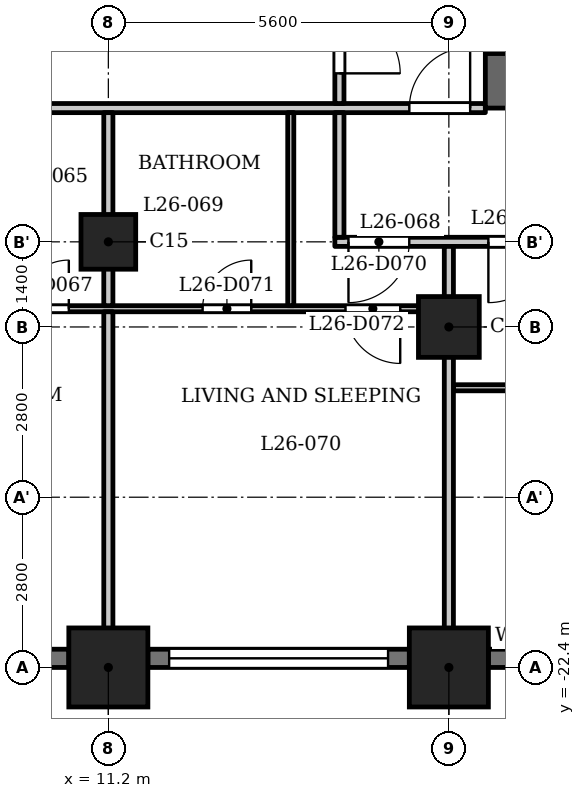
"""IFC4 building model, lengths in metres.
Left out: names, types, materials, properties, quantities, classifications, styles, units other than length and angle.
Written with IfcOpenShell. Run it as: python <this file> out.ifc"""

import sys

from ifc_helpers import new_model, si_unit, direction, frame, frame_2d, origin, origin_2d, place, context, subcontext, project, spatial, rectangle, extrude, element, fill, save


model = new_model("IFC4")
c1 = context("Model", 3, precision=1e-05, world=origin(), true_north=direction((0.0, 1.0)))
c2 = subcontext(c1, "Body", "Model", "MODEL_VIEW")
j1 = project(units=[si_unit("LENGTHUNIT", "METRE"), si_unit("PLANEANGLEUNIT", "RADIAN")], contexts=[c1])
p1 = place(None, origin())
s1 = spatial("IfcSite", under=j1, at=p1, CompositionType="ELEMENT")
p2 = place(p1, origin())
s2 = spatial("IfcBuilding", under=s1, at=p2, CompositionType="ELEMENT")
p3 = place(p2, frame((0.0, 0.0, 104.3)))
s3 = spatial("IfcBuildingStorey", under=s2, at=p3, CompositionType="ELEMENT", Elevation=104.3)
for number, where, z_axis, x_axis in (
    (1, (11.2, -22.4, 0.0), (0.0, 0.0, 1.0), (1.0, 0.0, 0.0)),
    (2, (16.8, -22.4, 0.0), (0.0, 0.0, 1.0), (1.0, 0.0, 0.0)),
):
    element("IfcColumn", number, at=place(p3, frame(where, z_axis=z_axis, x_axis=x_axis)), inside=s3, PredefinedType="COLUMN", context=c2, shape_type="SweptSolid", body=[
        extrude(rectangle(XDim=1.3, YDim=1.3, at=origin_2d()), origin(), (0.0, 0.0, 1.0), 3.5),
    ])
p4 = place(p3, frame((16.8, -16.8, 0.0), z_axis=(0.0, 0.0, 1.0), x_axis=(1.0, 0.0, 0.0)))
e3 = element("IfcColumn", 3, at=p4, inside=s3, PredefinedType="COLUMN", context=c2, shape_type="SweptSolid", body=[
    extrude(rectangle(XDim=1.0, YDim=1.0, at=origin_2d()), origin(), (0.0, 0.0, 1.0), 3.5),
])
p5 = place(p3, frame((11.2, -15.4, 0.0), z_axis=(0.0, 0.0, 1.0), x_axis=(1.0, 0.0, 0.0)))
e4 = element("IfcColumn", 4, at=p5, inside=s3, PredefinedType="COLUMN", context=c2, shape_type="SweptSolid", body=[
    extrude(rectangle(XDim=0.9, YDim=0.9, at=origin_2d()), origin(), (0.0, 0.0, 1.0), 3.5),
])
p6 = place(p3, frame((6.25, -22.25, 0.0), z_axis=(0.0, 0.0, 1.0), x_axis=(1.0, 0.0, 0.0)))
e5 = element("IfcWall", 5, at=p6, inside=s3, PredefinedType="SOLIDWALL", context=c2, shape_type="SweptSolid", body=[
    extrude(rectangle(XDim=4.3, YDim=0.3, at=frame_2d((2.15, 0.0))), origin(), (0.0, 0.0, 1.0), 2.4),
])
p7 = place(p6, frame((0.337, 0.0, 0.6)))
e6 = element("IfcOpeningElement", 6, at=p7, cuts=e5, PredefinedType="OPENING", context=c2, shape_type="SweptSolid", body=[
    extrude(rectangle(XDim=1.2, YDim=1.55, at=frame_2d((0.6, 0.775))), frame((0.0, 0.16, 0.0), z_axis=(0.0, -1.0, 0.0), x_axis=(1.0, 0.0, 0.0)), (0.0, 0.0, 1.0), 0.32),
])
p8 = place(p6, frame((2.562, 0.0, 0.6)))
e7 = element("IfcOpeningElement", 7, at=p8, cuts=e5, PredefinedType="OPENING", context=c2, shape_type="SweptSolid", body=[
    extrude(rectangle(XDim=1.2, YDim=1.55, at=frame_2d((0.6, 0.775))), frame((0.0, 0.16, 0.0), z_axis=(0.0, -1.0, 0.0), x_axis=(1.0, 0.0, 0.0)), (0.0, 0.0, 1.0), 0.32),
])
p9 = place(p3, frame((11.85, -22.25, 0.0), z_axis=(0.0, 0.0, 1.0), x_axis=(1.0, 0.0, 0.0)))
e8 = element("IfcWall", 8, at=p9, inside=s3, PredefinedType="SOLIDWALL", context=c2, shape_type="SweptSolid", body=[
    extrude(rectangle(XDim=4.3, YDim=0.3, at=frame_2d((2.15, 0.0))), origin(), (0.0, 0.0, 1.0), 2.4),
])
p10 = place(p9, frame((0.35, 0.0, 1.2)))
e9 = element("IfcOpeningElement", 9, at=p10, cuts=e8, PredefinedType="OPENING", context=c2, shape_type="SweptSolid", body=[
    extrude(rectangle(XDim=3.6, YDim=0.95, at=frame_2d((1.8, 0.475))), frame((0.0, 0.16, 0.0), z_axis=(0.0, -1.0, 0.0), x_axis=(1.0, 0.0, 0.0)), (0.0, 0.0, 1.0), 0.32),
])
p11 = place(p3, frame((17.45, -22.25, 0.0), z_axis=(0.0, 0.0, 1.0), x_axis=(1.0, 0.0, 0.0)))
e10 = element("IfcWall", 10, at=p11, inside=s3, PredefinedType="SOLIDWALL", context=c2, shape_type="SweptSolid", body=[
    extrude(rectangle(XDim=2.55, YDim=0.3, at=frame_2d((1.275, 0.0))), origin(), (0.0, 0.0, 1.0), 2.4),
])
p12 = place(p11, frame((0.375, 0.0, 0.9)))
e11 = element("IfcOpeningElement", 11, at=p12, cuts=e10, PredefinedType="OPENING", context=c2, shape_type="SweptSolid", body=[
    extrude(rectangle(XDim=1.8, YDim=1.25, at=frame_2d((0.9, 0.625))), frame((0.0, 0.16, 0.0), z_axis=(0.0, -1.0, 0.0), x_axis=(1.0, 0.0, 0.0)), (0.0, 0.0, 1.0), 0.32),
])
p13 = place(p3, frame((17.4, -12.75, 0.0), z_axis=(0.0, 0.0, 1.0), x_axis=(1.0, 0.0, 0.0)))
e12 = element("IfcWall", 12, at=p13, inside=s3, PredefinedType="SHEAR", context=c2, shape_type="SweptSolid", body=[
    extrude(rectangle(XDim=10.4, YDim=0.9, at=frame_2d((5.2, 0.0))), origin(), (0.0, 0.0, 1.0), 3.2),
])
p14 = place(p3, frame((17.6, -12.3, 0.0), z_axis=(0.0, 0.0, 1.0), x_axis=(0.0, 1.0, 0.0)))
e13 = element("IfcWall", 13, at=p14, inside=s3, PredefinedType="SHEAR", context=c2, shape_type="SweptSolid", body=[
    extrude(rectangle(XDim=24.6, YDim=0.4, at=frame_2d((12.3, 0.0))), origin(), (0.0, 0.0, 1.0), 3.2),
])
p15 = place(p14, frame((6.0, 0.0, 0.0)))
e14 = element("IfcOpeningElement", 14, at=p15, cuts=e13, PredefinedType="OPENING", context=c2, shape_type="SweptSolid", body=[
    extrude(rectangle(XDim=1.1, YDim=2.1, at=frame_2d((0.55, 1.05))), frame((0.0, 0.21, 0.0), z_axis=(0.0, -1.0, 0.0), x_axis=(1.0, 0.0, 0.0)), (0.0, 0.0, 1.0), 0.42),
])
p16 = place(p14, frame((8.4, 0.0, 0.0)))
e15 = element("IfcOpeningElement", 15, at=p16, cuts=e13, PredefinedType="OPENING", context=c2, shape_type="SweptSolid", body=[
    extrude(rectangle(XDim=1.1, YDim=2.1, at=frame_2d((0.55, 1.05))), frame((0.0, 0.21, 0.0), z_axis=(0.0, -1.0, 0.0), x_axis=(1.0, 0.0, 0.0)), (0.0, 0.0, 1.0), 0.42),
])
p17 = place(p14, frame((10.8, 0.0, 0.0)))
e16 = element("IfcOpeningElement", 16, at=p17, cuts=e13, PredefinedType="OPENING", context=c2, shape_type="SweptSolid", body=[
    extrude(rectangle(XDim=1.1, YDim=2.1, at=frame_2d((0.55, 1.05))), frame((0.0, 0.21, 0.0), z_axis=(0.0, -1.0, 0.0), x_axis=(1.0, 0.0, 0.0)), (0.0, 0.0, 1.0), 0.42),
])
p18 = place(p14, frame((16.75, 0.0, 0.0)))
e17 = element("IfcOpeningElement", 17, at=p18, cuts=e13, PredefinedType="OPENING", context=c2, shape_type="SweptSolid", body=[
    extrude(rectangle(XDim=0.9, YDim=2.1, at=frame_2d((0.45, 1.05))), frame((0.0, 0.21, 0.0), z_axis=(0.0, -1.0, 0.0), x_axis=(1.0, 0.0, 0.0)), (0.0, 0.0, 1.0), 0.42),
])
p19 = place(p14, frame((22.8, 0.0, 0.0)))
e18 = element("IfcOpeningElement", 18, at=p19, cuts=e13, PredefinedType="OPENING", context=c2, shape_type="SweptSolid", body=[
    extrude(rectangle(XDim=1.1, YDim=2.1, at=frame_2d((0.55, 1.05))), frame((0.0, 0.21, 0.0), z_axis=(0.0, -1.0, 0.0), x_axis=(1.0, 0.0, 0.0)), (0.0, 0.0, 1.0), 0.42),
])
p20 = place(p14, frame((0.7, 0.0, 0.0)))
e19 = element("IfcOpeningElement", 19, at=p20, cuts=e13, PredefinedType="OPENING", context=c2, shape_type="SweptSolid", body=[
    extrude(rectangle(XDim=1.1, YDim=2.1, at=frame_2d((0.55, 1.05))), frame((0.0, 0.21, 0.0), z_axis=(0.0, -1.0, 0.0), x_axis=(1.0, 0.0, 0.0)), (0.0, 0.0, 1.0), 0.42),
])
p21 = place(p14, frame((12.775, 0.0, 0.0)))
e20 = element("IfcOpeningElement", 20, at=p21, cuts=e13, PredefinedType="OPENING", context=c2, shape_type="SweptSolid", body=[
    extrude(rectangle(XDim=1.8, YDim=2.1, at=frame_2d((0.9, 1.05))), frame((0.0, 0.21, 0.0), z_axis=(0.0, -1.0, 0.0), x_axis=(1.0, 0.0, 0.0)), (0.0, 0.0, 1.0), 0.42),
])
p22 = place(p3, frame((16.875, -17.8, 0.0), z_axis=(0.0, 0.0, 1.0), x_axis=(1.0, 0.0, 0.0)))
e21 = element("IfcWall", 21, at=p22, inside=s3, PredefinedType="PARTITIONING", context=c2, shape_type="SweptSolid", body=[
    extrude(rectangle(XDim=9.679, YDim=0.1, at=frame_2d((4.84, 0.0))), origin(), (0.0, 0.0, 1.0), 3.2),
])
p23 = place(p22, frame((6.093, 0.0, 0.0)))
e22 = element("IfcOpeningElement", 22, at=p23, cuts=e21, PredefinedType="OPENING", context=c2, shape_type="SweptSolid", body=[
    extrude(rectangle(XDim=0.8, YDim=2.1, at=frame_2d((0.4, 1.05))), frame((0.0, 0.06, 0.0), z_axis=(0.0, -1.0, 0.0), x_axis=(1.0, 0.0, 0.0)), (0.0, 0.0, 1.0), 0.12),
])
p24 = place(p22, frame((1.575, 0.0, 0.0)))
e23 = element("IfcOpeningElement", 23, at=p24, cuts=e21, PredefinedType="OPENING", context=c2, shape_type="SweptSolid", body=[
    extrude(rectangle(XDim=0.9, YDim=2.1, at=frame_2d((0.45, 1.05))), frame((0.0, 0.06, 0.0), z_axis=(0.0, -1.0, 0.0), x_axis=(1.0, 0.0, 0.0)), (0.0, 0.0, 1.0), 0.12),
])
p25 = place(p3, frame((-16.725, -16.5, 0.0), z_axis=(0.0, 0.0, 1.0), x_axis=(1.0, 0.0, 0.0)))
e24 = element("IfcWall", 24, at=p25, inside=s3, PredefinedType="PARTITIONING", context=c2, shape_type="SweptSolid", body=[
    extrude(rectangle(XDim=33.45, YDim=0.1, at=frame_2d((16.725, 0.0))), origin(), (0.0, 0.0, 1.0), 3.2),
])
p26 = place(p25, frame((4.075, 0.0, 0.0)))
e25 = element("IfcOpeningElement", 25, at=p26, cuts=e24, PredefinedType="OPENING", context=c2, shape_type="SweptSolid", body=[
    extrude(rectangle(XDim=0.8, YDim=2.1, at=frame_2d((0.4, 1.05))), frame((0.0, 0.06, 0.0), z_axis=(0.0, -1.0, 0.0), x_axis=(1.0, 0.0, 0.0)), (0.0, 0.0, 1.0), 0.12),
])
p27 = place(p25, frame((1.075, 0.0, 0.0)))
e26 = element("IfcOpeningElement", 26, at=p27, cuts=e24, PredefinedType="OPENING", context=c2, shape_type="SweptSolid", body=[
    extrude(rectangle(XDim=0.9, YDim=2.1, at=frame_2d((0.45, 1.05))), frame((0.0, 0.06, 0.0), z_axis=(0.0, -1.0, 0.0), x_axis=(1.0, 0.0, 0.0)), (0.0, 0.0, 1.0), 0.12),
])
p28 = place(p25, frame((9.675, 0.0, 0.0)))
e27 = element("IfcOpeningElement", 27, at=p28, cuts=e24, PredefinedType="OPENING", context=c2, shape_type="SweptSolid", body=[
    extrude(rectangle(XDim=0.8, YDim=2.1, at=frame_2d((0.4, 1.05))), frame((0.0, 0.06, 0.0), z_axis=(0.0, -1.0, 0.0), x_axis=(1.0, 0.0, 0.0)), (0.0, 0.0, 1.0), 0.12),
])
p29 = place(p25, frame((7.675, 0.0, 0.0)))
e28 = element("IfcOpeningElement", 28, at=p29, cuts=e24, PredefinedType="OPENING", context=c2, shape_type="SweptSolid", body=[
    extrude(rectangle(XDim=0.9, YDim=2.1, at=frame_2d((0.45, 1.05))), frame((0.0, 0.06, 0.0), z_axis=(0.0, -1.0, 0.0), x_axis=(1.0, 0.0, 0.0)), (0.0, 0.0, 1.0), 0.12),
])
p30 = place(p25, frame((15.275, 0.0, 0.0)))
e29 = element("IfcOpeningElement", 29, at=p30, cuts=e24, PredefinedType="OPENING", context=c2, shape_type="SweptSolid", body=[
    extrude(rectangle(XDim=0.8, YDim=2.1, at=frame_2d((0.4, 1.05))), frame((0.0, 0.06, 0.0), z_axis=(0.0, -1.0, 0.0), x_axis=(1.0, 0.0, 0.0)), (0.0, 0.0, 1.0), 0.12),
])
p31 = place(p25, frame((11.775, 0.0, 0.0)))
e30 = element("IfcOpeningElement", 30, at=p31, cuts=e24, PredefinedType="OPENING", context=c2, shape_type="SweptSolid", body=[
    extrude(rectangle(XDim=0.9, YDim=2.1, at=frame_2d((0.45, 1.05))), frame((0.0, 0.06, 0.0), z_axis=(0.0, -1.0, 0.0), x_axis=(1.0, 0.0, 0.0)), (0.0, 0.0, 1.0), 0.12),
])
p32 = place(p25, frame((20.625, 0.0, 0.0)))
e31 = element("IfcOpeningElement", 31, at=p32, cuts=e24, PredefinedType="OPENING", context=c2, shape_type="SweptSolid", body=[
    extrude(rectangle(XDim=0.8, YDim=2.1, at=frame_2d((0.4, 1.05))), frame((0.0, 0.06, 0.0), z_axis=(0.0, -1.0, 0.0), x_axis=(1.0, 0.0, 0.0)), (0.0, 0.0, 1.0), 0.12),
])
p33 = place(p25, frame((18.375, 0.0, 0.0)))
e32 = element("IfcOpeningElement", 32, at=p33, cuts=e24, PredefinedType="OPENING", context=c2, shape_type="SweptSolid", body=[
    extrude(rectangle(XDim=0.9, YDim=2.1, at=frame_2d((0.45, 1.05))), frame((0.0, 0.06, 0.0), z_axis=(0.0, -1.0, 0.0), x_axis=(1.0, 0.0, 0.0)), (0.0, 0.0, 1.0), 0.12),
])
p34 = place(p25, frame((26.475, 0.0, 0.0)))
e33 = element("IfcOpeningElement", 33, at=p34, cuts=e24, PredefinedType="OPENING", context=c2, shape_type="SweptSolid", body=[
    extrude(rectangle(XDim=0.8, YDim=2.1, at=frame_2d((0.4, 1.05))), frame((0.0, 0.06, 0.0), z_axis=(0.0, -1.0, 0.0), x_axis=(1.0, 0.0, 0.0)), (0.0, 0.0, 1.0), 0.12),
])
p35 = place(p25, frame((23.225, 0.0, 0.0)))
e34 = element("IfcOpeningElement", 34, at=p35, cuts=e24, PredefinedType="OPENING", context=c2, shape_type="SweptSolid", body=[
    extrude(rectangle(XDim=0.9, YDim=2.1, at=frame_2d((0.45, 1.05))), frame((0.0, 0.06, 0.0), z_axis=(0.0, -1.0, 0.0), x_axis=(1.0, 0.0, 0.0)), (0.0, 0.0, 1.0), 0.12),
])
p36 = place(p25, frame((29.475, 0.0, 0.0)))
e35 = element("IfcOpeningElement", 35, at=p36, cuts=e24, PredefinedType="OPENING", context=c2, shape_type="SweptSolid", body=[
    extrude(rectangle(XDim=0.8, YDim=2.1, at=frame_2d((0.4, 1.05))), frame((0.0, 0.06, 0.0), z_axis=(0.0, -1.0, 0.0), x_axis=(1.0, 0.0, 0.0)), (0.0, 0.0, 1.0), 0.12),
])
p37 = place(p25, frame((31.825, 0.0, 0.0)))
e36 = element("IfcOpeningElement", 36, at=p37, cuts=e24, PredefinedType="OPENING", context=c2, shape_type="SweptSolid", body=[
    extrude(rectangle(XDim=0.9, YDim=2.1, at=frame_2d((0.45, 1.05))), frame((0.0, 0.06, 0.0), z_axis=(0.0, -1.0, 0.0), x_axis=(1.0, 0.0, 0.0)), (0.0, 0.0, 1.0), 0.12),
])
p38 = place(p3, frame((14.925, -15.4, 0.0), z_axis=(0.0, 0.0, 1.0), x_axis=(1.0, 0.0, 0.0)))
e37 = element("IfcWall", 37, at=p38, inside=s3, PredefinedType="PARTITIONING", context=c2, shape_type="SweptSolid", body=[
    extrude(rectangle(XDim=12.559, YDim=0.15, at=frame_2d((6.279, 0.0))), origin(), (0.0, 0.0, 1.0), 3.2),
])
p39 = place(p38, frame((0.224, 0.0, 0.0)))
e38 = element("IfcOpeningElement", 38, at=p39, cuts=e37, PredefinedType="OPENING", context=c2, shape_type="SweptSolid", body=[
    extrude(rectangle(XDim=1.0, YDim=2.1, at=frame_2d((0.5, 1.05))), frame((0.0, 0.085, 0.0), z_axis=(0.0, -1.0, 0.0), x_axis=(1.0, 0.0, 0.0)), (0.0, 0.0, 1.0), 0.17),
])
p40 = place(p38, frame((2.525, 0.0, 0.0)))
e39 = element("IfcOpeningElement", 39, at=p40, cuts=e37, PredefinedType="OPENING", context=c2, shape_type="SweptSolid", body=[
    extrude(rectangle(XDim=1.0, YDim=2.1, at=frame_2d((0.5, 1.05))), frame((0.0, 0.085, 0.0), z_axis=(0.0, -1.0, 0.0), x_axis=(1.0, 0.0, 0.0)), (0.0, 0.0, 1.0), 0.17),
])
p41 = place(p3, frame((-17.4, -13.2, 0.0), z_axis=(0.0, 0.0, 1.0), x_axis=(1.0, 0.0, 0.0)))
e40 = element("IfcWall", 40, at=p41, inside=s3, PredefinedType="PARTITIONING", context=c2, shape_type="SweptSolid", body=[
    extrude(rectangle(XDim=34.8, YDim=0.15, at=frame_2d((17.4, 0.0))), origin(), (0.0, 0.0, 1.0), 3.2),
])
p42 = place(p41, frame((0.15, 0.0, 0.0)))
e41 = element("IfcOpeningElement", 41, at=p42, cuts=e40, PredefinedType="OPENING", context=c2, shape_type="SweptSolid", body=[
    extrude(rectangle(XDim=1.0, YDim=2.1, at=frame_2d((0.5, 1.05))), frame((0.0, 0.085, 0.0), z_axis=(0.0, -1.0, 0.0), x_axis=(1.0, 0.0, 0.0)), (0.0, 0.0, 1.0), 0.17),
])
p43 = place(p41, frame((33.55, 0.0, 0.0)))
e42 = element("IfcOpeningElement", 42, at=p43, cuts=e40, PredefinedType="OPENING", context=c2, shape_type="SweptSolid", body=[
    extrude(rectangle(XDim=1.0, YDim=2.1, at=frame_2d((0.5, 1.05))), frame((0.0, 0.085, 0.0), z_axis=(0.0, -1.0, 0.0), x_axis=(1.0, 0.0, 0.0)), (0.0, 0.0, 1.0), 0.17),
])
p44 = place(p41, frame((8.1, 0.0, 0.0)))
e43 = element("IfcOpeningElement", 43, at=p44, cuts=e40, PredefinedType="OPENING", context=c2, shape_type="SweptSolid", body=[
    extrude(rectangle(XDim=1.0, YDim=2.1, at=frame_2d((0.5, 1.05))), frame((0.0, 0.085, 0.0), z_axis=(0.0, -1.0, 0.0), x_axis=(1.0, 0.0, 0.0)), (0.0, 0.0, 1.0), 0.17),
])
p45 = place(p41, frame((12.45, 0.0, 0.0)))
e44 = element("IfcOpeningElement", 44, at=p45, cuts=e40, PredefinedType="OPENING", context=c2, shape_type="SweptSolid", body=[
    extrude(rectangle(XDim=1.0, YDim=2.1, at=frame_2d((0.5, 1.05))), frame((0.0, 0.085, 0.0), z_axis=(0.0, -1.0, 0.0), x_axis=(1.0, 0.0, 0.0)), (0.0, 0.0, 1.0), 0.17),
])
p46 = place(p41, frame((19.05, 0.0, 0.0)))
e45 = element("IfcOpeningElement", 45, at=p46, cuts=e40, PredefinedType="OPENING", context=c2, shape_type="SweptSolid", body=[
    extrude(rectangle(XDim=1.0, YDim=2.1, at=frame_2d((0.5, 1.05))), frame((0.0, 0.085, 0.0), z_axis=(0.0, -1.0, 0.0), x_axis=(1.0, 0.0, 0.0)), (0.0, 0.0, 1.0), 0.17),
])
p47 = place(p41, frame((24.9, 0.0, 0.0)))
e46 = element("IfcOpeningElement", 46, at=p47, cuts=e40, PredefinedType="OPENING", context=c2, shape_type="SweptSolid", body=[
    extrude(rectangle(XDim=1.0, YDim=2.1, at=frame_2d((0.5, 1.05))), frame((0.0, 0.085, 0.0), z_axis=(0.0, -1.0, 0.0), x_axis=(1.0, 0.0, 0.0)), (0.0, 0.0, 1.0), 0.17),
])
p48 = place(p3, frame((11.2, -23.03, 0.0), z_axis=(0.0, 0.0, 1.0), x_axis=(0.0, 1.0, 0.0)))
e47 = element("IfcWall", 47, at=p48, inside=s3, PredefinedType="PARTITIONING", context=c2, shape_type="SweptSolid", body=[
    extrude(rectangle(XDim=6.48, YDim=0.15, at=frame_2d((3.24, 0.0))), origin(), (0.0, 0.0, 1.0), 3.2),
])
p49 = place(p3, frame((11.2, -16.45, 0.0), z_axis=(0.0, 0.0, 1.0), x_axis=(0.0, 1.0, 0.0)))
e48 = element("IfcWall", 48, at=p49, inside=s3, PredefinedType="PARTITIONING", context=c2, shape_type="SweptSolid", body=[
    extrude(rectangle(XDim=3.175, YDim=0.15, at=frame_2d((1.587, 0.0))), origin(), (0.0, 0.0, 1.0), 3.2),
])
p50 = place(p3, frame((14.2, -16.45, 0.0), z_axis=(0.0, 0.0, 1.0), x_axis=(0.0, 1.0, 0.0)))
e49 = element("IfcWall", 49, at=p50, inside=s3, PredefinedType="PARTITIONING", context=c2, shape_type="SweptSolid", body=[
    extrude(rectangle(XDim=3.175, YDim=0.1, at=frame_2d((1.587, 0.0))), origin(), (0.0, 0.0, 1.0), 3.2),
])
p51 = place(p3, frame((15.0, -15.325, 0.0), z_axis=(0.0, 0.0, 1.0), x_axis=(0.0, 1.0, 0.0)))
e50 = element("IfcWall", 50, at=p51, inside=s3, PredefinedType="PARTITIONING", context=c2, shape_type="SweptSolid", body=[
    extrude(rectangle(XDim=2.05, YDim=0.15, at=frame_2d((1.025, 0.0))), origin(), (0.0, 0.0, 1.0), 3.2),
])
p52 = place(p3, frame((15.0, -13.125, 0.0), z_axis=(0.0, 0.0, 1.0), x_axis=(0.0, 1.0, 0.0)))
e51 = element("IfcWall", 51, at=p52, inside=s3, PredefinedType="PARTITIONING", context=c2, shape_type="SweptSolid", body=[
    extrude(rectangle(XDim=6.356, YDim=0.15, at=frame_2d((3.178, 0.0))), origin(), (0.0, 0.0, 1.0), 3.2),
])
p53 = place(p52, frame((0.496, 0.0, 0.0)))
e52 = element("IfcOpeningElement", 52, at=p53, cuts=e51, PredefinedType="OPENING", context=c2, shape_type="SweptSolid", body=[
    extrude(rectangle(XDim=1.0, YDim=2.1, at=frame_2d((0.5, 1.05))), frame((0.0, 0.085, 0.0), z_axis=(0.0, -1.0, 0.0), x_axis=(1.0, 0.0, 0.0)), (0.0, 0.0, 1.0), 0.17),
])
p54 = place(p3, frame((16.8, -23.03, 0.0), z_axis=(0.0, 0.0, 1.0), x_axis=(0.0, 1.0, 0.0)))
e53 = element("IfcWall", 53, at=p54, inside=s3, PredefinedType="PARTITIONING", context=c2, shape_type="SweptSolid", body=[
    extrude(rectangle(XDim=7.555, YDim=0.15, at=frame_2d((3.777, 0.0))), origin(), (0.0, 0.0, 1.0), 3.2),
])
p55 = place(p53, origin())
e54 = element("IfcDoor", 54, at=p55, inside=s3, OperationType="SINGLE_SWING_LEFT", PredefinedType="DOOR", context=c2, shape_type="SweptSolid", body=[
    extrude(rectangle(XDim=1.0, YDim=2.1, at=frame_2d((0.5, 1.05))), frame((0.0, 0.025, 0.0), z_axis=(0.0, -1.0, 0.0), x_axis=(1.0, 0.0, 0.0)), (0.0, 0.0, 1.0), 0.05),
])
fill(e52, e54)
p56 = place(p43, origin())
e55 = element("IfcDoor", 55, at=p56, inside=s3, OperationType="SINGLE_SWING_LEFT", PredefinedType="DOOR", context=c2, shape_type="SweptSolid", body=[
    extrude(rectangle(XDim=1.0, YDim=2.1, at=frame_2d((0.5, 1.05))), frame((0.0, 0.025, 0.0), z_axis=(0.0, -1.0, 0.0), x_axis=(1.0, 0.0, 0.0)), (0.0, 0.0, 1.0), 0.05),
])
fill(e42, e55)
p57 = place(p34, origin())
e56 = element("IfcDoor", 56, at=p57, inside=s3, OperationType="SINGLE_SWING_LEFT", PredefinedType="DOOR", context=c2, shape_type="SweptSolid", body=[
    extrude(rectangle(XDim=0.8, YDim=2.1, at=frame_2d((0.4, 1.05))), frame((0.0, 0.025, 0.0), z_axis=(0.0, -1.0, 0.0), x_axis=(1.0, 0.0, 0.0)), (0.0, 0.0, 1.0), 0.05),
])
fill(e33, e56)
p58 = place(p39, origin())
e57 = element("IfcDoor", 57, at=p58, inside=s3, OperationType="SINGLE_SWING_LEFT", PredefinedType="DOOR", context=c2, shape_type="SweptSolid", body=[
    extrude(rectangle(XDim=1.0, YDim=2.1, at=frame_2d((0.5, 1.05))), frame((0.0, 0.025, 0.0), z_axis=(0.0, -1.0, 0.0), x_axis=(1.0, 0.0, 0.0)), (0.0, 0.0, 1.0), 0.05),
])
fill(e38, e57)
p59 = place(p36, origin())
e58 = element("IfcDoor", 58, at=p59, inside=s3, OperationType="SINGLE_SWING_LEFT", PredefinedType="DOOR", context=c2, shape_type="SweptSolid", body=[
    extrude(rectangle(XDim=0.8, YDim=2.1, at=frame_2d((0.4, 1.05))), frame((0.0, 0.025, 0.0), z_axis=(0.0, -1.0, 0.0), x_axis=(1.0, 0.0, 0.0)), (0.0, 0.0, 1.0), 0.05),
])
fill(e35, e58)
p60 = place(p37, origin())
e59 = element("IfcDoor", 59, at=p60, inside=s3, OperationType="SINGLE_SWING_RIGHT", PredefinedType="DOOR", context=c2, shape_type="SweptSolid", body=[
    extrude(rectangle(XDim=0.9, YDim=2.1, at=frame_2d((0.45, 1.05))), frame((0.0, 0.025, 0.0), z_axis=(0.0, -1.0, 0.0), x_axis=(1.0, 0.0, 0.0)), (0.0, 0.0, 1.0), 0.05),
])
fill(e36, e59)
p61 = place(p40, origin())
e60 = element("IfcDoor", 60, at=p61, inside=s3, OperationType="SINGLE_SWING_LEFT", PredefinedType="DOOR", context=c2, shape_type="SweptSolid", body=[
    extrude(rectangle(XDim=1.0, YDim=2.1, at=frame_2d((0.5, 1.05))), frame((0.0, 0.025, 0.0), z_axis=(0.0, -1.0, 0.0), x_axis=(1.0, 0.0, 0.0)), (0.0, 0.0, 1.0), 0.05),
])
fill(e39, e60)
p62 = place(p10, origin())
e61 = element("IfcWindow", 61, at=p62, inside=s3, PartitioningType="SINGLE_PANEL", PredefinedType="WINDOW", context=c2, shape_type="SweptSolid", body=[
    extrude(rectangle(XDim=3.6, YDim=0.95, at=frame_2d((1.8, 0.475))), frame((0.0, 0.03, 0.0), z_axis=(0.0, -1.0, 0.0), x_axis=(1.0, 0.0, 0.0)), (0.0, 0.0, 1.0), 0.06),
])
fill(e9, e61)
save(model, sys.argv[1])
